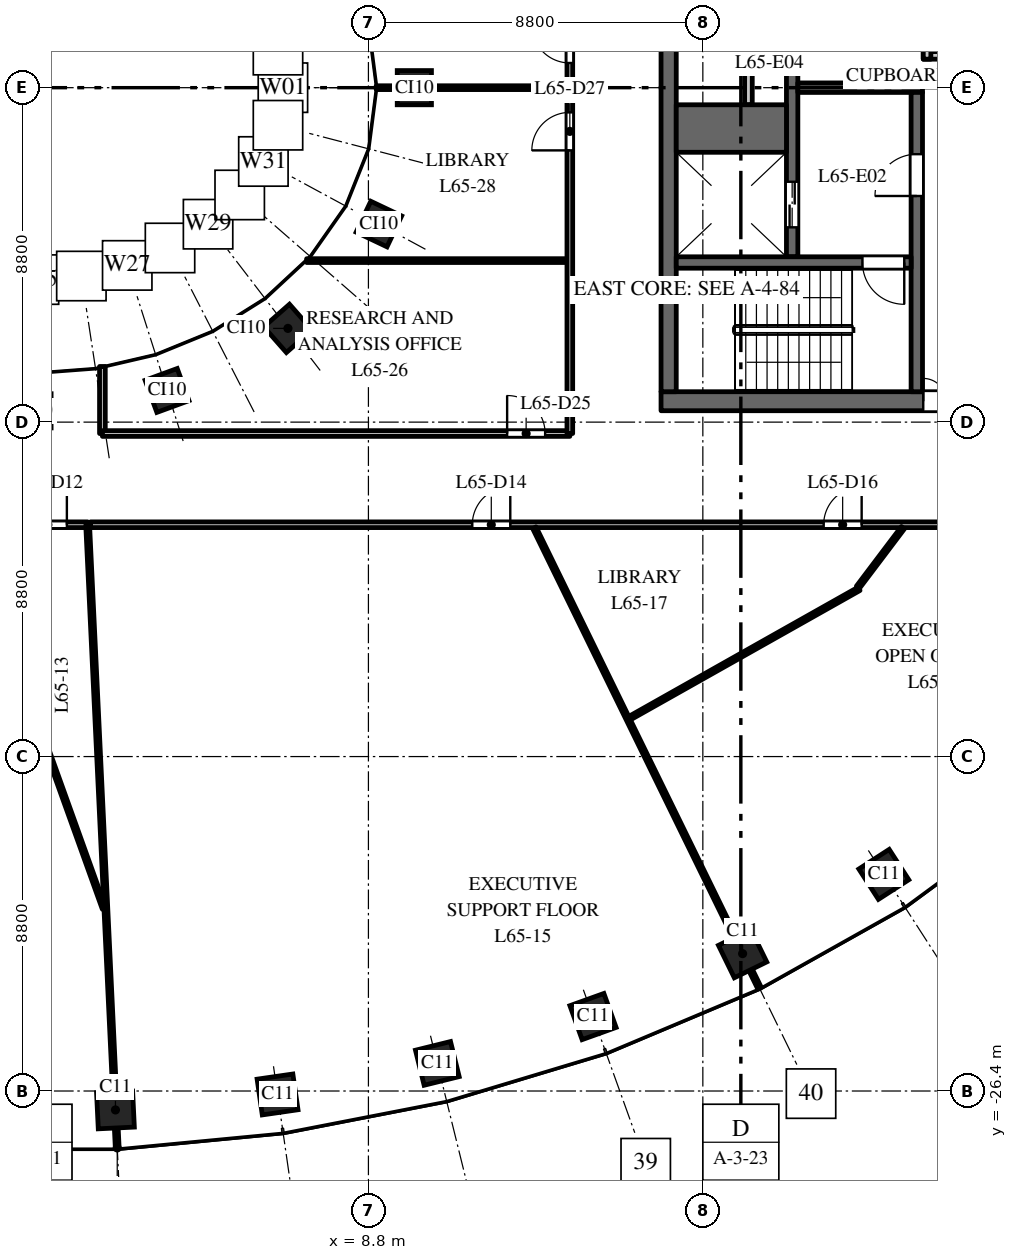
"""IFC4 building model, lengths in metres.
Left out: names, types, materials, properties, quantities, classifications, styles, units other than length and angle.
Written with IfcOpenShell. Run it as: python <this file> out.ifc"""

import sys

from ifc_helpers import new_model, si_unit, direction, frame, frame_2d, origin, origin_2d, place, context, subcontext, project, spatial, rectangle, extrude, element, fill, save


model = new_model("IFC4")
c1 = context("Model", 3, precision=1e-05, world=origin(), true_north=direction((0.0, 1.0)))
c2 = subcontext(c1, "Body", "Model", "MODEL_VIEW")
j1 = project(units=[si_unit("LENGTHUNIT", "METRE"), si_unit("PLANEANGLEUNIT", "RADIAN")], contexts=[c1])
p1 = place(None, origin())
s1 = spatial("IfcSite", under=j1, at=p1, CompositionType="ELEMENT")
p2 = place(p1, origin())
s2 = spatial("IfcBuilding", under=s1, at=p2, CompositionType="ELEMENT")
p3 = place(p2, frame((0.0, 0.0, 303.0)))
s3 = spatial("IfcBuildingStorey", under=s2, at=p3, CompositionType="ELEMENT", Elevation=303.0)
for number, where, z_axis, x_axis in (
    (1, (2.143, -26.898, 0.0), (0.0, 0.0, 1.0), (0.999, 0.048, 0.0)),
    (2, (6.409, -26.491, 0.0), (0.0, 0.0, 1.0), (0.99, 0.143, 0.0)),
    (3, (10.613, -25.674, 0.0), (0.0, 0.0, 1.0), (0.971, 0.24, 0.0)),
    (4, (14.709, -24.441, 0.0), (0.0, 0.0, 1.0), (0.941, 0.338, 0.0)),
    (5, (18.646, -22.785, 0.0), (0.0, 0.0, 1.0), (0.898, 0.439, 0.0)),
    (6, (22.362, -20.7, 0.0), (0.0, 0.0, 1.0), (0.84, 0.542, 0.0)),
):
    element("IfcColumn", number, at=place(p3, frame(where, z_axis=z_axis, x_axis=x_axis)), inside=s3, PredefinedType="COLUMN", context=c2, shape_type="SweptSolid", body=[
        extrude(rectangle(XDim=0.95, YDim=0.95, at=origin_2d()), origin(), (0.0, 0.0, 1.0), 4.0),
    ])
for number, where, z_axis, x_axis in (
    (7, (10.008, 0.0, 0.0), (0.0, 0.0, 1.0), (0.0, 1.0, 0.0)),
    (8, (3.501, -7.967, 0.0), (0.0, 0.0, 1.0), (0.939, 0.344, 0.0)),
    (9, (6.682, -6.334, 0.0), (0.0, 0.0, 1.0), (0.751, 0.66, 0.0)),
    (10, (9.076, -3.588, 0.0), (0.0, 0.0, 1.0), (0.429, 0.903, 0.0)),
):
    element("IfcColumn", number, at=place(p3, frame(where, z_axis=z_axis, x_axis=x_axis)), inside=s3, PredefinedType="COLUMN", context=c2, shape_type="SweptSolid", body=[
        extrude(rectangle(XDim=0.9, YDim=0.9, at=origin_2d()), origin(), (0.0, 0.0, 1.0), 4.0),
    ])
p4 = place(p3, frame((16.5, -8.25, 0.0), z_axis=(0.0, 0.0, 1.0), x_axis=(1.0, 0.0, 0.0)))
e11 = element("IfcWall", 11, at=p4, inside=s3, PredefinedType="SHEAR", context=c2, shape_type="SweptSolid", body=[
    extrude(rectangle(XDim=15.0, YDim=0.5, at=frame_2d((7.5, 0.0))), origin(), (0.0, 0.0, 1.0), 3.7),
])
p5 = place(p4, frame((6.9, 0.0, 0.0)))
e12 = element("IfcOpeningElement", 12, at=p5, cuts=e11, PredefinedType="OPENING", context=c2, shape_type="SweptSolid", body=[
    extrude(rectangle(XDim=1.2, YDim=2.1, at=frame_2d((0.6, 1.05))), frame((0.0, 0.26, 0.0), z_axis=(0.0, -1.0, 0.0), x_axis=(1.0, 0.0, 0.0)), (0.0, 0.0, 1.0), 0.52),
])
p6 = place(p4, frame((12.425, 0.0, 0.0)))
e13 = element("IfcOpeningElement", 13, at=p6, cuts=e11, PredefinedType="OPENING", context=c2, shape_type="SweptSolid", body=[
    extrude(rectangle(XDim=0.9, YDim=2.1, at=frame_2d((0.45, 1.05))), frame((0.0, 0.26, 0.0), z_axis=(0.0, -1.0, 0.0), x_axis=(1.0, 0.0, 0.0)), (0.0, 0.0, 1.0), 0.52),
])
p7 = place(p3, frame((18.8, -0.45, 0.0), z_axis=(0.0, 0.0, 1.0), x_axis=(0.0, 1.0, 0.0)))
e14 = element("IfcWall", 14, at=p7, inside=s3, PredefinedType="PARTITIONING", context=c2, shape_type="SweptSolid", body=[
    extrude(rectangle(XDim=4.9, YDim=0.2, at=frame_2d((2.45, 0.0))), origin(), (0.0, 0.0, 1.0), 3.7),
])
p8 = place(p7, frame((2.0, 0.0, 0.0)))
e15 = element("IfcOpeningElement", 15, at=p8, cuts=e14, PredefinedType="OPENING", context=c2, shape_type="SweptSolid", body=[
    extrude(rectangle(XDim=0.9, YDim=2.1, at=frame_2d((0.45, 1.05))), frame((0.0, 0.11, 0.0), z_axis=(0.0, -1.0, 0.0), x_axis=(1.0, 0.0, 0.0)), (0.0, 0.0, 1.0), 0.22),
])
p9 = place(p3, frame((19.95, -4.45, 0.0), z_axis=(0.0, 0.0, 1.0), x_axis=(0.0, 1.0, 0.0)))
e16 = element("IfcWall", 16, at=p9, inside=s3, PredefinedType="SHEAR", context=c2, shape_type="SweptSolid", body=[
    extrude(rectangle(XDim=8.9, YDim=0.3, at=frame_2d((4.45, 0.0))), origin(), (0.0, 0.0, 1.0), 3.7),
])
p10 = place(p9, frame((0.775, 0.0, 0.0)))
e17 = element("IfcOpeningElement", 17, at=p10, cuts=e16, PredefinedType="OPENING", context=c2, shape_type="SweptSolid", body=[
    extrude(rectangle(XDim=1.2, YDim=2.1, at=frame_2d((0.6, 1.05))), frame((0.0, 0.16, 0.0), z_axis=(0.0, -1.0, 0.0), x_axis=(1.0, 0.0, 0.0)), (0.0, 0.0, 1.0), 0.32),
])
p11 = place(p9, frame((6.0, 0.0, 0.0)))
e18 = element("IfcOpeningElement", 18, at=p11, cuts=e16, PredefinedType="OPENING", context=c2, shape_type="SweptSolid", body=[
    extrude(rectangle(XDim=0.9, YDim=2.1, at=frame_2d((0.45, 1.05))), frame((0.0, 0.16, 0.0), z_axis=(0.0, -1.0, 0.0), x_axis=(1.0, 0.0, 0.0)), (0.0, 0.0, 1.0), 0.32),
])
p12 = place(p3, frame((20.1, 0.0, 0.0), z_axis=(0.0, 0.0, 1.0), x_axis=(1.0, 0.0, 0.0)))
e19 = element("IfcWall", 19, at=p12, inside=s3, PredefinedType="SHEAR", context=c2, shape_type="SweptSolid", body=[
    extrude(rectangle(XDim=3.28, YDim=0.25, at=frame_2d((1.64, 0.0))), origin(), (0.0, 0.0, 1.0), 3.7),
])
p13 = place(p3, frame((16.7, -8.0, 0.0), z_axis=(0.0, 0.0, 1.0), x_axis=(0.0, 1.0, 0.0)))
e20 = element("IfcWall", 20, at=p13, inside=s3, PredefinedType="SHEAR", context=c2, shape_type="SweptSolid", body=[
    extrude(rectangle(XDim=16.0, YDim=0.4, at=frame_2d((8.0, 0.0))), origin(), (0.0, 0.0, 1.0), 3.7),
])
p14 = place(p3, frame((23.4, 0.85, 0.0), z_axis=(0.0, 0.0, 1.0), x_axis=(1.0, 0.0, 0.0)))
e21 = element("IfcWall", 21, at=p14, inside=s3, PredefinedType="PARTITIONING", context=c2, shape_type="SweptSolid", body=[
    extrude(rectangle(XDim=1.2, YDim=0.2, at=frame_2d((0.6, 0.0))), origin(), (0.0, 0.0, 1.0), 3.7),
])
p15 = place(p3, frame((23.5, 0.75, 0.0), z_axis=(0.0, 0.0, 1.0), x_axis=(0.0, 1.0, 0.0)))
e22 = element("IfcWall", 22, at=p15, inside=s3, PredefinedType="PARTITIONING", context=c2, shape_type="SweptSolid", body=[
    extrude(rectangle(XDim=1.6, YDim=0.2, at=frame_2d((0.8, 0.0))), origin(), (0.0, 0.0, 1.0), 3.7),
])
p16 = place(p15, frame((0.25, 0.0, 0.0)))
e23 = element("IfcOpeningElement", 23, at=p16, cuts=e22, PredefinedType="OPENING", context=c2, shape_type="SweptSolid", body=[
    extrude(rectangle(XDim=0.9, YDim=2.1, at=frame_2d((0.45, 1.05))), frame((0.0, 0.11, 0.0), z_axis=(0.0, -1.0, 0.0), x_axis=(1.0, 0.0, 0.0)), (0.0, 0.0, 1.0), 0.22),
])
p17 = place(p3, frame((16.9, -1.075, 0.0), z_axis=(0.0, 0.0, 1.0), x_axis=(1.0, 0.0, 0.0)))
e24 = element("IfcWall", 24, at=p17, inside=s3, PredefinedType="SHEAR", context=c2, shape_type="SweptSolid", body=[
    extrude(rectangle(XDim=2.9, YDim=1.25, at=frame_2d((1.45, 0.0))), origin(), (0.0, 0.0, 1.0), 3.7),
])
p18 = place(p3, frame((23.23, -8.0, 0.0), z_axis=(0.0, 0.0, 1.0), x_axis=(0.0, 1.0, 0.0)))
e25 = element("IfcWall", 25, at=p18, inside=s3, PredefinedType="SHEAR", context=c2, shape_type="SweptSolid", body=[
    extrude(rectangle(XDim=7.875, YDim=0.3, at=frame_2d((3.938, 0.0))), origin(), (0.0, 0.0, 1.0), 3.7),
])
p19 = place(p18, frame((5.15, 0.0, 0.0)))
e26 = element("IfcOpeningElement", 26, at=p19, cuts=e25, PredefinedType="OPENING", context=c2, shape_type="SweptSolid", body=[
    extrude(rectangle(XDim=1.1, YDim=2.1, at=frame_2d((0.55, 1.05))), frame((0.0, 0.16, 0.0), z_axis=(0.0, -1.0, 0.0), x_axis=(1.0, 0.0, 0.0)), (0.0, 0.0, 1.0), 0.32),
])
p20 = place(p3, frame((16.9, -4.6, 0.0), z_axis=(0.0, 0.0, 1.0), x_axis=(1.0, 0.0, 0.0)))
e27 = element("IfcWall", 27, at=p20, inside=s3, PredefinedType="SHEAR", context=c2, shape_type="SweptSolid", body=[
    extrude(rectangle(XDim=6.18, YDim=0.3, at=frame_2d((3.09, 0.0))), origin(), (0.0, 0.0, 1.0), 3.7),
])
p21 = place(p20, frame((4.9, 0.0, 0.0)))
e28 = element("IfcOpeningElement", 28, at=p21, cuts=e27, PredefinedType="OPENING", context=c2, shape_type="SweptSolid", body=[
    extrude(rectangle(XDim=1.1, YDim=2.1, at=frame_2d((0.55, 1.05))), frame((0.0, 0.16, 0.0), z_axis=(0.0, -1.0, 0.0), x_axis=(1.0, 0.0, 0.0)), (0.0, 0.0, 1.0), 0.32),
])
p22 = place(p3, frame((-1.757, -11.579, 0.0), z_axis=(0.0, 0.0, 1.0), x_axis=(0.338284366688, -0.941043934816, 0.0)))
e29 = element("IfcWall", 29, at=p22, inside=s3, PredefinedType="PARTITIONING", context=c2, shape_type="SweptSolid", body=[
    extrude(rectangle(XDim=10.651, YDim=0.1, at=frame_2d((5.325, 0.0))), origin(), (0.0, 0.0, 1.0), 2.85),
])
p23 = place(p3, frame((-1.774, -11.5, 0.0), z_axis=(0.0, 0.0, 1.0), x_axis=(1.0, 0.0, 0.0)))
e30 = element("IfcWall", 30, at=p23, inside=s3, PredefinedType="PARTITIONING", context=c2, shape_type="SweptSolid", body=[
    extrude(rectangle(XDim=3.184, YDim=0.15, at=frame_2d((1.592, 0.0))), origin(), (0.0, 0.0, 1.0), 2.85),
])
p24 = place(p23, frame((1.639, 0.0, 0.0)))
e31 = element("IfcOpeningElement", 31, at=p24, cuts=e30, PredefinedType="OPENING", context=c2, shape_type="SweptSolid", body=[
    extrude(rectangle(XDim=1.0, YDim=2.1, at=frame_2d((0.5, 1.05))), frame((0.0, 0.085, 0.0), z_axis=(0.0, -1.0, 0.0), x_axis=(1.0, 0.0, 0.0)), (0.0, 0.0, 1.0), 0.17),
])
p25 = place(p3, frame((1.412, -11.51, 0.0), z_axis=(0.0, 0.0, 1.0), x_axis=(0.047410314178, -0.998875498803, 0.0)))
e32 = element("IfcWall", 32, at=p25, inside=s3, PredefinedType="PARTITIONING", context=c2, shape_type="SweptSolid", body=[
    extrude(rectangle(XDim=16.406, YDim=0.1, at=frame_2d((8.203, 0.0))), origin(), (0.0, 0.0, 1.0), 3.0),
])
p26 = place(p3, frame((1.8, -9.1, 0.0), z_axis=(0.0, 0.0, 1.0), x_axis=(0.0, 1.0, 0.0)))
e33 = element("IfcWall", 33, at=p26, inside=s3, PredefinedType="PARTITIONING", context=c2, shape_type="SweptSolid", body=[
    extrude(rectangle(XDim=1.764, YDim=0.15, at=frame_2d((0.882, 0.0))), origin(), (0.0, 0.0, 1.0), 3.0),
])
p27 = place(p3, frame((1.8, -9.1, 0.0), z_axis=(0.0, 0.0, 1.0), x_axis=(1.0, 0.0, 0.0)))
e34 = element("IfcWall", 34, at=p27, inside=s3, PredefinedType="PARTITIONING", context=c2, shape_type="SweptSolid", body=[
    extrude(rectangle(XDim=12.3, YDim=0.15, at=frame_2d((6.15, 0.0))), origin(), (0.0, 0.0, 1.0), 2.85),
])
p28 = place(p27, frame((10.65, 0.0, 0.0)))
e35 = element("IfcOpeningElement", 35, at=p28, cuts=e34, PredefinedType="OPENING", context=c2, shape_type="SweptSolid", body=[
    extrude(rectangle(XDim=1.0, YDim=2.1, at=frame_2d((0.5, 1.05))), frame((0.0, 0.085, 0.0), z_axis=(0.0, -1.0, 0.0), x_axis=(1.0, 0.0, 0.0)), (0.0, 0.0, 1.0), 0.17),
])
p29 = place(p3, frame((1.485, -11.5, 0.0), z_axis=(0.0, 0.0, 1.0), x_axis=(1.0, 0.0, 0.0)))
e36 = element("IfcWall", 36, at=p29, inside=s3, PredefinedType="PARTITIONING", context=c2, shape_type="SweptSolid", body=[
    extrude(rectangle(XDim=30.015, YDim=0.15, at=frame_2d((15.007, 0.0))), origin(), (0.0, 0.0, 1.0), 2.75),
])
p30 = place(p29, frame((10.048, 0.0, 0.0)))
e37 = element("IfcOpeningElement", 37, at=p30, cuts=e36, PredefinedType="OPENING", context=c2, shape_type="SweptSolid", body=[
    extrude(rectangle(XDim=1.0, YDim=2.1, at=frame_2d((0.5, 1.05))), frame((0.0, 0.085, 0.0), z_axis=(0.0, -1.0, 0.0), x_axis=(1.0, 0.0, 0.0)), (0.0, 0.0, 1.0), 0.17),
])
p31 = place(p29, frame((19.294, 0.0, 0.0)))
e38 = element("IfcOpeningElement", 38, at=p31, cuts=e36, PredefinedType="OPENING", context=c2, shape_type="SweptSolid", body=[
    extrude(rectangle(XDim=1.0, YDim=2.1, at=frame_2d((0.5, 1.05))), frame((0.0, 0.085, 0.0), z_axis=(0.0, -1.0, 0.0), x_axis=(1.0, 0.0, 0.0)), (0.0, 0.0, 1.0), 0.17),
])
p32 = place(p29, frame((27.583, 0.0, 0.0)))
e39 = element("IfcOpeningElement", 39, at=p32, cuts=e36, PredefinedType="OPENING", context=c2, shape_type="SweptSolid", body=[
    extrude(rectangle(XDim=1.0, YDim=2.1, at=frame_2d((0.5, 1.05))), frame((0.0, 0.085, 0.0), z_axis=(0.0, -1.0, 0.0), x_axis=(1.0, 0.0, 0.0)), (0.0, 0.0, 1.0), 0.17),
])
p33 = place(p3, frame((7.174, -4.55, 0.0), z_axis=(0.0, 0.0, 1.0), x_axis=(1.0, 0.0, 0.0)))
e40 = element("IfcWall", 40, at=p33, inside=s3, PredefinedType="PARTITIONING", context=c2, shape_type="SweptSolid", body=[
    extrude(rectangle(XDim=6.851, YDim=0.1, at=frame_2d((3.425, 0.0))), origin(), (0.0, 0.0, 1.0), 2.75),
])
p34 = place(p3, frame((9.005, 0.0, 0.0), z_axis=(0.0, 0.0, 1.0), x_axis=(1.0, 0.0, 0.0)))
e41 = element("IfcWall", 41, at=p34, inside=s3, PredefinedType="PARTITIONING", context=c2, shape_type="SweptSolid", body=[
    extrude(rectangle(XDim=5.02, YDim=0.1, at=frame_2d((2.51, 0.0))), origin(), (0.0, 0.0, 1.0), 3.7),
])
p35 = place(p3, frame((13.167, -11.579, 0.0), z_axis=(0.0, 0.0, 1.0), x_axis=(0.439297212097, -0.8983417832, 0.0)))
e42 = element("IfcWall", 42, at=p35, inside=s3, PredefinedType="PARTITIONING", context=c2, shape_type="SweptSolid", body=[
    extrude(rectangle(XDim=13.476, YDim=0.1, at=frame_2d((6.738, 0.0))), origin(), (0.0, 0.0, 1.0), 3.0),
])
p36 = place(p3, frame((14.1, -9.1, 0.0), z_axis=(0.0, 0.0, 1.0), x_axis=(0.0, 1.0, 0.0)))
e43 = element("IfcWall", 43, at=p36, inside=s3, PredefinedType="PARTITIONING", context=c2, shape_type="SweptSolid", body=[
    extrude(rectangle(XDim=18.2, YDim=0.15, at=frame_2d((9.1, 0.0))), origin(), (0.0, 0.0, 1.0), 2.75),
])
p37 = place(p36, frame((7.45, 0.0, 0.0)))
e44 = element("IfcOpeningElement", 44, at=p37, cuts=e43, PredefinedType="OPENING", context=c2, shape_type="SweptSolid", body=[
    extrude(rectangle(XDim=1.0, YDim=2.1, at=frame_2d((0.5, 1.05))), frame((0.0, 0.085, 0.0), z_axis=(0.0, -1.0, 0.0), x_axis=(1.0, 0.0, 0.0)), (0.0, 0.0, 1.0), 0.17),
])
p38 = place(p36, frame((9.75, 0.0, 0.0)))
e45 = element("IfcOpeningElement", 45, at=p38, cuts=e43, PredefinedType="OPENING", context=c2, shape_type="SweptSolid", body=[
    extrude(rectangle(XDim=1.0, YDim=2.1, at=frame_2d((0.5, 1.05))), frame((0.0, 0.085, 0.0), z_axis=(0.0, -1.0, 0.0), x_axis=(1.0, 0.0, 0.0)), (0.0, 0.0, 1.0), 0.17),
])
p39 = place(p3, frame((15.673, -16.589, 0.0), z_axis=(0.0, 0.0, 1.0), x_axis=(0.871190555515, 0.490945023381, 0.0)))
e46 = element("IfcWall", 46, at=p39, inside=s3, PredefinedType="PARTITIONING", context=c2, shape_type="SweptSolid", body=[
    extrude(rectangle(XDim=6.932, YDim=0.1, at=frame_2d((3.466, 0.0))), origin(), (0.0, 0.0, 1.0), 3.7),
])
p40 = place(p3, frame((21.679, -13.148, 0.0), z_axis=(0.0, 0.0, 1.0), x_axis=(0.602755856466, 0.797925671661, 0.0)))
e47 = element("IfcWall", 47, at=p40, inside=s3, PredefinedType="PARTITIONING", context=c2, shape_type="SweptSolid", body=[
    extrude(rectangle(XDim=1.968, YDim=0.1, at=frame_2d((0.984, 0.0))), origin(), (0.0, 0.0, 1.0), 2.75),
])
p41 = place(p10, origin())
e48 = element("IfcDoor", 48, at=p41, inside=s3, OperationType="DOUBLE_DOOR_SLIDING", PredefinedType="DOOR", context=c2, shape_type="SweptSolid", body=[
    extrude(rectangle(XDim=1.2, YDim=2.1, at=frame_2d((0.6, 1.05))), frame((0.0, 0.025, 0.0), z_axis=(0.0, -1.0, 0.0), x_axis=(1.0, 0.0, 0.0)), (0.0, 0.0, 1.0), 0.05),
])
fill(e17, e48)
p42 = place(p21, origin())
e49 = element("IfcDoor", 49, at=p42, inside=s3, OperationType="SINGLE_SWING_RIGHT", PredefinedType="DOOR", context=c2, shape_type="SweptSolid", body=[
    extrude(rectangle(XDim=1.1, YDim=2.1, at=frame_2d((0.55, 1.05))), frame((0.0, 0.025, 0.0), z_axis=(0.0, -1.0, 0.0), x_axis=(1.0, 0.0, 0.0)), (0.0, 0.0, 1.0), 0.05),
])
fill(e28, e49)
p43 = place(p19, origin())
e50 = element("IfcDoor", 50, at=p43, inside=s3, OperationType="SINGLE_SWING_RIGHT", PredefinedType="DOOR", context=c2, shape_type="SweptSolid", body=[
    extrude(rectangle(XDim=1.1, YDim=2.1, at=frame_2d((0.55, 1.05))), frame((0.0, 0.025, 0.0), z_axis=(0.0, -1.0, 0.0), x_axis=(1.0, 0.0, 0.0)), (0.0, 0.0, 1.0), 0.05),
])
fill(e26, e50)
p44 = place(p5, origin())
e51 = element("IfcDoor", 51, at=p44, inside=s3, OperationType="DOUBLE_DOOR_DOUBLE_SWING", PredefinedType="DOOR", context=c2, shape_type="SweptSolid", body=[
    extrude(rectangle(XDim=1.2, YDim=2.1, at=frame_2d((0.6, 1.05))), frame((0.0, 0.025, 0.0), z_axis=(0.0, -1.0, 0.0), x_axis=(1.0, 0.0, 0.0)), (0.0, 0.0, 1.0), 0.05),
])
fill(e12, e51)
p45 = place(p24, origin())
e52 = element("IfcDoor", 52, at=p45, inside=s3, OperationType="SINGLE_SWING_RIGHT", PredefinedType="DOOR", context=c2, shape_type="SweptSolid", body=[
    extrude(rectangle(XDim=1.0, YDim=2.1, at=frame_2d((0.5, 1.05))), frame((0.0, 0.025, 0.0), z_axis=(0.0, -1.0, 0.0), x_axis=(1.0, 0.0, 0.0)), (0.0, 0.0, 1.0), 0.05),
])
fill(e31, e52)
p46 = place(p30, origin())
e53 = element("IfcDoor", 53, at=p46, inside=s3, OperationType="SINGLE_SWING_RIGHT", PredefinedType="DOOR", context=c2, shape_type="SweptSolid", body=[
    extrude(rectangle(XDim=1.0, YDim=2.1, at=frame_2d((0.5, 1.05))), frame((0.0, 0.025, 0.0), z_axis=(0.0, -1.0, 0.0), x_axis=(1.0, 0.0, 0.0)), (0.0, 0.0, 1.0), 0.05),
])
fill(e37, e53)
p47 = place(p31, origin())
e54 = element("IfcDoor", 54, at=p47, inside=s3, OperationType="SINGLE_SWING_RIGHT", PredefinedType="DOOR", context=c2, shape_type="SweptSolid", body=[
    extrude(rectangle(XDim=1.0, YDim=2.1, at=frame_2d((0.5, 1.05))), frame((0.0, 0.025, 0.0), z_axis=(0.0, -1.0, 0.0), x_axis=(1.0, 0.0, 0.0)), (0.0, 0.0, 1.0), 0.05),
])
fill(e38, e54)
p48 = place(p28, origin())
e55 = element("IfcDoor", 55, at=p48, inside=s3, OperationType="SINGLE_SWING_LEFT", PredefinedType="DOOR", context=c2, shape_type="SweptSolid", body=[
    extrude(rectangle(XDim=1.0, YDim=2.1, at=frame_2d((0.5, 1.05))), frame((0.0, 0.025, 0.0), z_axis=(0.0, -1.0, 0.0), x_axis=(1.0, 0.0, 0.0)), (0.0, 0.0, 1.0), 0.05),
])
fill(e35, e55)
p49 = place(p37, origin())
e56 = element("IfcDoor", 56, at=p49, inside=s3, OperationType="SINGLE_SWING_LEFT", PredefinedType="DOOR", context=c2, shape_type="SweptSolid", body=[
    extrude(rectangle(XDim=1.0, YDim=2.1, at=frame_2d((0.5, 1.05))), frame((0.0, 0.025, 0.0), z_axis=(0.0, -1.0, 0.0), x_axis=(1.0, 0.0, 0.0)), (0.0, 0.0, 1.0), 0.05),
])
fill(e44, e56)
p50 = place(p38, origin())
e57 = element("IfcDoor", 57, at=p50, inside=s3, OperationType="SINGLE_SWING_RIGHT", PredefinedType="DOOR", context=c2, shape_type="SweptSolid", body=[
    extrude(rectangle(XDim=1.0, YDim=2.1, at=frame_2d((0.5, 1.05))), frame((0.0, 0.025, 0.0), z_axis=(0.0, -1.0, 0.0), x_axis=(1.0, 0.0, 0.0)), (0.0, 0.0, 1.0), 0.05),
])
fill(e45, e57)
save(model, sys.argv[1])
